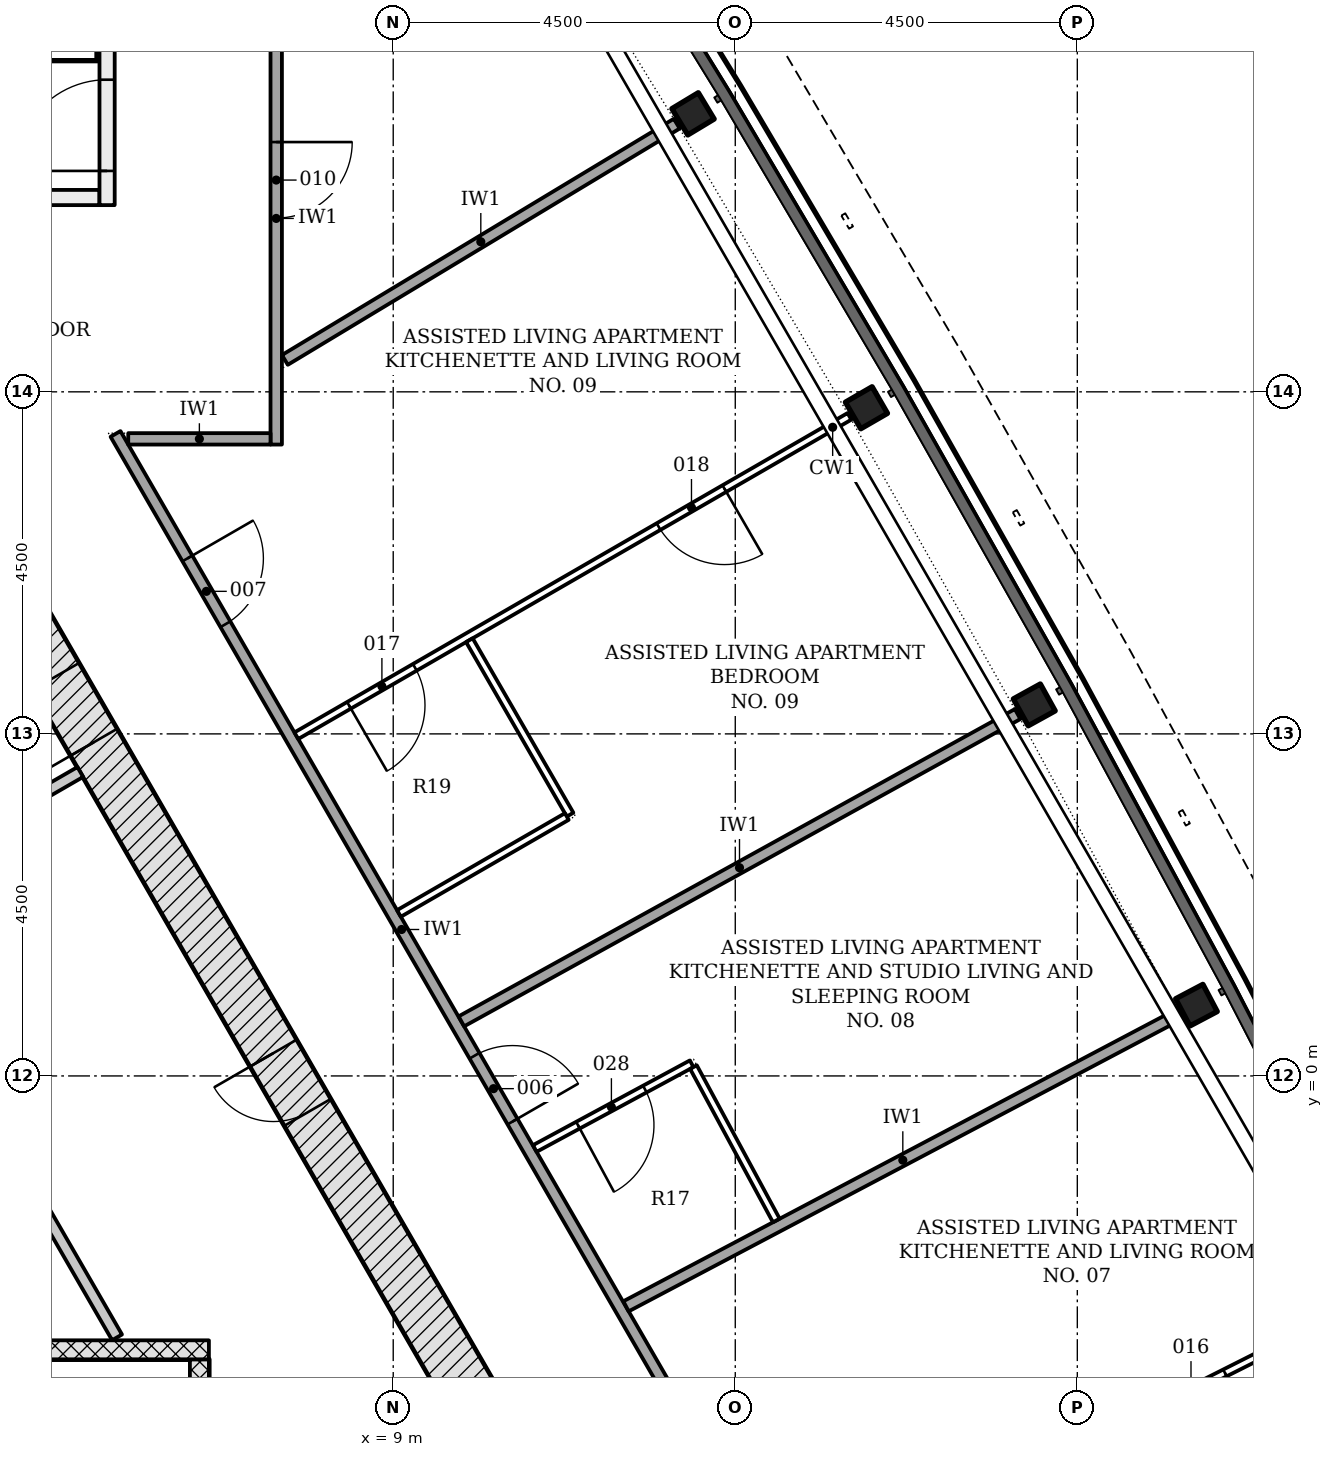
"""IFC4 building model, lengths in metres.
Left out: names, types, materials, properties, quantities, classifications, styles, units other than length and angle.
Written with IfcOpenShell. Run it as: python <this file> out.ifc"""

import sys

from ifc_helpers import new_model, si_unit, direction, frame, frame_2d, origin, origin_2d, place, context, subcontext, project, spatial, rectangle, i_section, extrude, element, fill, save


model = new_model("IFC4")
c1 = context("Model", 3, precision=1e-05, world=origin(), true_north=direction((0.0, 1.0)))
c2 = subcontext(c1, "Body", "Model", "MODEL_VIEW")
j1 = project(units=[si_unit("LENGTHUNIT", "METRE"), si_unit("PLANEANGLEUNIT", "RADIAN")], contexts=[c1])
p1 = place(None, origin())
s1 = spatial("IfcSite", under=j1, at=p1, CompositionType="ELEMENT")
p2 = place(p1, origin())
s2 = spatial("IfcBuilding", under=s1, at=p2, CompositionType="ELEMENT")
p3 = place(p2, frame((0.0, 0.0, 45.6)))
s3 = spatial("IfcBuildingStorey", under=s2, at=p3, CompositionType="ELEMENT", Elevation=45.6)
p4 = place(p3, frame((10.311, -4.703, -0.2), z_axis=(0.0, 0.0, 1.0), x_axis=(-0.500001446645, 0.866024568562, 0.0)))
e1 = element("IfcWall", 1, at=p4, inside=s3, PredefinedType="SHEAR", context=c2, shape_type="SweptSolid", body=[
    extrude(rectangle(XDim=18.458, YDim=0.7, at=frame_2d((9.229, 0.0))), origin(), (0.0, 0.0, 1.0), 3.6),
])
p5 = place(p4, frame((10.5, 0.0, 0.2)))
e2 = element("IfcOpeningElement", 2, at=p5, cuts=e1, PredefinedType="OPENING", context=c2, shape_type="SweptSolid", body=[
    extrude(rectangle(XDim=1.0, YDim=2.1, at=frame_2d((0.5, 1.05))), frame((0.0, 0.36, 0.0), z_axis=(0.0, -1.0, 0.0), x_axis=(1.0, 0.0, 0.0)), (0.0, 0.0, 1.0), 0.72),
])
p6 = place(p4, frame((4.877, 0.0, 0.2)))
e3 = element("IfcOpeningElement", 3, at=p6, cuts=e1, PredefinedType="OPENING", context=c2, shape_type="SweptSolid", body=[
    extrude(rectangle(XDim=0.9, YDim=2.1, at=frame_2d((0.45, 1.05))), frame((0.0, 0.36, 0.0), z_axis=(0.0, -1.0, 0.0), x_axis=(1.0, 0.0, 0.0)), (0.0, 0.0, 1.0), 0.72),
])
p7 = place(p4, frame((14.452, 0.0, 0.2)))
e4 = element("IfcOpeningElement", 4, at=p7, cuts=e1, PredefinedType="OPENING", context=c2, shape_type="SweptSolid", body=[
    extrude(rectangle(XDim=0.9, YDim=2.1, at=frame_2d((0.45, 1.05))), frame((0.0, 0.36, 0.0), z_axis=(0.0, -1.0, 0.0), x_axis=(1.0, 0.0, 0.0)), (0.0, 0.0, 1.0), 0.72),
])
for number, where, z_axis, x_axis in (
    (5, (19.567, 0.931, -0.2), (0.0, 0.0, 1.0), (-0.467, 0.884, 0.0)),
    (6, (17.434, 4.882, -0.2), (0.0, 0.0, 1.0), (-0.484, 0.875, 0.0)),
    (7, (15.226, 8.791, -0.2), (0.0, 0.0, 1.0), (-0.5, 0.866, 0.0)),
    (8, (12.944, 12.657, -0.2), (0.0, 0.0, 1.0), (-0.516, 0.856, 0.0)),
):
    element("IfcColumn", number, at=place(p3, frame(where, z_axis=z_axis, x_axis=x_axis)), inside=s3, PredefinedType="COLUMN", context=c2, shape_type="SweptSolid", body=[
        extrude(i_section(OverallWidth=0.404, OverallDepth=0.406, WebThickness=0.027, FlangeThickness=0.044, FilletRadius=0.015, at=origin_2d()), origin(), (0.0, 0.0, 1.0), 3.6),
    ])
p8 = place(p3, frame((6.45, -6.228, -0.2), z_axis=(0.0, 0.0, 1.0), x_axis=(0.0, 1.0, 0.0)))
e9 = element("IfcWall", 9, at=p8, inside=s3, PredefinedType="PARTITIONING", context=c2, shape_type="SweptSolid", body=[
    extrude(rectangle(XDim=2.5, YDim=0.25, at=frame_2d((1.25, 0.0))), origin(), (0.0, 0.0, 1.0), 3.6),
])
p9 = place(p3, frame((-6.575, -3.603, 0.0), z_axis=(0.0, 0.0, 1.0), x_axis=(1.0, 0.0, 0.0)))
e10 = element("IfcWall", 10, at=p9, inside=s3, PredefinedType="PARTITIONING", context=c2, shape_type="SweptSolid", body=[
    extrude(rectangle(XDim=13.15, YDim=0.25, at=frame_2d((6.575, 0.0))), origin(), (0.0, 0.0, 1.0), 3.4),
])
p10 = place(p3, frame((-4.198, -1.244, 0.0), z_axis=(0.0, 0.0, 1.0), x_axis=(0.866020798945, 0.500007975732, 0.0)))
e11 = element("IfcWall", 11, at=p10, inside=s3, PredefinedType="PARTITIONING", context=c2, shape_type="SweptSolid", body=[
    extrude(rectangle(XDim=10.486, YDim=0.15, at=frame_2d((5.243, 0.0))), origin(), (0.0, 0.0, 1.0), 3.4),
])
p11 = place(p10, frame((3.736, 0.0, 0.0)))
e12 = element("IfcOpeningElement", 12, at=p11, cuts=e11, PredefinedType="OPENING", context=c2, shape_type="SweptSolid", body=[
    extrude(rectangle(XDim=0.9, YDim=2.1, at=frame_2d((0.45, 1.05))), frame((0.0, 0.085, 0.0), z_axis=(0.0, -1.0, 0.0), x_axis=(1.0, 0.0, 0.0)), (0.0, 0.0, 1.0), 0.17),
])
p12 = place(p10, frame((0.144, 0.0, 0.0)))
e13 = element("IfcOpeningElement", 13, at=p12, cuts=e11, PredefinedType="OPENING", context=c2, shape_type="SweptSolid", body=[
    extrude(rectangle(XDim=0.9, YDim=2.1, at=frame_2d((0.45, 1.05))), frame((0.0, 0.085, 0.0), z_axis=(0.0, -1.0, 0.0), x_axis=(1.0, 0.0, 0.0)), (0.0, 0.0, 1.0), 0.17),
])
p13 = place(p3, frame((5.367, -3.439, 0.0), z_axis=(0.0, 0.0, 1.0), x_axis=(-0.499981499682, 0.866036084685, 0.0)))
e14 = element("IfcWall", 14, at=p13, inside=s3, PredefinedType="PARTITIONING", context=c2, shape_type="SweptSolid", body=[
    extrude(rectangle(XDim=6.608, YDim=0.15, at=frame_2d((3.304, 0.0))), origin(), (0.0, 0.0, 1.0), 3.4),
])
p14 = place(p3, frame((5.135, 11.556, -0.2), z_axis=(0.0, 0.0, 1.0), x_axis=(-1.0, 0.0, 0.0)))
e15 = element("IfcWall", 15, at=p14, inside=s3, PredefinedType="SHEAR", context=c2, shape_type="SweptSolid", body=[
    extrude(rectangle(XDim=3.55, YDim=0.2, at=frame_2d((1.775, 0.0))), origin(), (0.0, 0.0, 1.0), 3.6),
])
p15 = place(p14, frame((1.175, 0.0, 0.2)))
e16 = element("IfcOpeningElement", 16, at=p15, cuts=e15, PredefinedType="OPENING", context=c2, shape_type="SweptSolid", body=[
    extrude(rectangle(XDim=1.2, YDim=2.1, at=frame_2d((0.6, 1.05))), frame((0.0, 0.11, 0.0), z_axis=(0.0, -1.0, 0.0), x_axis=(1.0, 0.0, 0.0)), (0.0, 0.0, 1.0), 0.22),
])
p16 = place(p3, frame((5.236, 11.456, -0.2), z_axis=(0.0, 0.0, 1.0), x_axis=(0.0, 1.0, 0.0)))
e17 = element("IfcWall", 17, at=p16, inside=s3, PredefinedType="SHEAR", context=c2, shape_type="SweptSolid", body=[
    extrude(rectangle(XDim=5.6, YDim=0.2, at=frame_2d((2.8, 0.0))), origin(), (0.0, 0.0, 1.0), 3.6),
])
p17 = place(p16, frame((0.45, 0.0, 0.2)))
e18 = element("IfcOpeningElement", 18, at=p17, cuts=e17, PredefinedType="OPENING", context=c2, shape_type="SweptSolid", body=[
    extrude(rectangle(XDim=1.2, YDim=2.1, at=frame_2d((0.6, 1.05))), frame((0.0, 0.11, 0.0), z_axis=(0.0, -1.0, 0.0), x_axis=(1.0, 0.0, 0.0)), (0.0, 0.0, 1.0), 0.22),
])
p18 = place(p3, frame((5.346, 8.446, 0.0), z_axis=(0.0, 0.0, 1.0), x_axis=(0.500008781656, -0.866020333634, 0.0)))
e19 = element("IfcWall", 19, at=p18, inside=s3, PredefinedType="PARTITIONING", context=c2, shape_type="SweptSolid", body=[
    extrude(rectangle(XDim=15.057, YDim=0.15, at=frame_2d((7.528, 0.0))), origin(), (0.0, 0.0, 1.0), 2.778),
])
p19 = place(p18, frame((9.446, 0.0, 0.0)))
e20 = element("IfcOpeningElement", 20, at=p19, cuts=e19, PredefinedType="OPENING", context=c2, shape_type="SweptSolid", body=[
    extrude(rectangle(XDim=1.0, YDim=2.1, at=frame_2d((0.5, 1.05))), frame((0.0, 0.085, 0.0), z_axis=(0.0, -1.0, 0.0), x_axis=(1.0, 0.0, 0.0)), (0.0, 0.0, 1.0), 0.17),
])
p20 = place(p18, frame((1.892, 0.0, 0.0)))
e21 = element("IfcOpeningElement", 21, at=p20, cuts=e19, PredefinedType="OPENING", context=c2, shape_type="SweptSolid", body=[
    extrude(rectangle(XDim=1.0, YDim=2.1, at=frame_2d((0.5, 1.05))), frame((0.0, 0.085, 0.0), z_axis=(0.0, -1.0, 0.0), x_axis=(1.0, 0.0, 0.0)), (0.0, 0.0, 1.0), 0.17),
])
p21 = place(p3, frame((7.461, 14.256, 0.0), z_axis=(0.0, 0.0, 1.0), x_axis=(0.0, -1.0, 0.0)))
e22 = element("IfcWall", 22, at=p21, inside=s3, PredefinedType="PARTITIONING", context=c2, shape_type="SweptSolid", body=[
    extrude(rectangle(XDim=5.95, YDim=0.15, at=frame_2d((2.975, 0.0))), origin(), (0.0, 0.0, 1.0), 2.778),
])
p22 = place(p21, frame((1.97, 0.0, 0.0)))
e23 = element("IfcOpeningElement", 23, at=p22, cuts=e22, PredefinedType="OPENING", context=c2, shape_type="SweptSolid", body=[
    extrude(rectangle(XDim=1.0, YDim=2.1, at=frame_2d((0.5, 1.05))), frame((0.0, 0.085, 0.0), z_axis=(0.0, -1.0, 0.0), x_axis=(1.0, 0.0, 0.0)), (0.0, 0.0, 1.0), 0.17),
])
p23 = place(p3, frame((5.514, 8.381, 0.0), z_axis=(0.0, 0.0, 1.0), x_axis=(1.0, 0.0, 0.0)))
e24 = element("IfcWall", 24, at=p23, inside=s3, PredefinedType="PARTITIONING", context=c2, shape_type="SweptSolid", body=[
    extrude(rectangle(XDim=1.872, YDim=0.15, at=frame_2d((0.936, 0.0))), origin(), (0.0, 0.0, 1.0), 2.778),
])
p24 = place(p3, frame((17.215, 4.76, 0.0), z_axis=(0.0, 0.0, 1.0), x_axis=(-0.875336511681, -0.483514210048, 0.0)))
e25 = element("IfcWall", 25, at=p24, inside=s3, PredefinedType="PARTITIONING", context=c2, shape_type="SweptSolid", body=[
    extrude(rectangle(XDim=8.361, YDim=0.15, at=frame_2d((4.18, 0.0))), origin(), (0.0, 0.0, 1.0), 2.778),
])
p25 = place(p3, frame((19.346, 0.815, 0.0), z_axis=(0.0, 0.0, 1.0), x_axis=(-0.884307928431, -0.466904152599, 0.0)))
e26 = element("IfcWall", 26, at=p25, inside=s3, PredefinedType="PARTITIONING", context=c2, shape_type="SweptSolid", body=[
    extrude(rectangle(XDim=8.237, YDim=0.15, at=frame_2d((4.118, 0.0))), origin(), (0.0, 0.0, 1.0), 2.778),
])
p26 = place(p3, frame((12.73, 12.528, 0.0), z_axis=(0.0, 0.0, 1.0), x_axis=(-0.856413986998, -0.516289727648, 0.0)))
e27 = element("IfcWall", 27, at=p26, inside=s3, PredefinedType="PARTITIONING", context=c2, shape_type="SweptSolid", body=[
    extrude(rectangle(XDim=6.02, YDim=0.15, at=frame_2d((3.01, 0.0))), origin(), (0.0, 0.0, 1.0), 2.778),
])
p27 = place(p3, frame((21.402, -3.171, 0.0), z_axis=(0.0, 0.0, 1.0), x_axis=(-0.892974760713, -0.450106739263, 0.0)))
e28 = element("IfcWall", 28, at=p27, inside=s3, PredefinedType="PARTITIONING", context=c2, shape_type="SweptSolid", body=[
    extrude(rectangle(XDim=8.971, YDim=0.1, at=frame_2d((4.486, 0.0))), origin(), (0.0, 0.0, 1.0), 2.847),
])
p28 = place(p27, frame((6.125, 0.0, 0.0)))
e29 = element("IfcOpeningElement", 29, at=p28, cuts=e28, PredefinedType="OPENING", context=c2, shape_type="SweptSolid", body=[
    extrude(rectangle(XDim=1.0, YDim=2.1, at=frame_2d((0.5, 1.05))), frame((0.0, 0.06, 0.0), z_axis=(0.0, -1.0, 0.0), x_axis=(1.0, 0.0, 0.0)), (0.0, 0.0, 1.0), 0.12),
])
p29 = place(p27, frame((1.635, 0.0, 0.0)))
e30 = element("IfcOpeningElement", 30, at=p29, cuts=e28, PredefinedType="OPENING", context=c2, shape_type="SweptSolid", body=[
    extrude(rectangle(XDim=1.0, YDim=2.1, at=frame_2d((0.5, 1.05))), frame((0.0, 0.06, 0.0), z_axis=(0.0, -1.0, 0.0), x_axis=(1.0, 0.0, 0.0)), (0.0, 0.0, 1.0), 0.12),
])
p30 = place(p3, frame((15.002, 8.677, 0.0), z_axis=(0.0, 0.0, 1.0), x_axis=(-0.866019139798, -0.500010849386, 0.0)))
e31 = element("IfcWall", 31, at=p30, inside=s3, PredefinedType="PARTITIONING", context=c2, shape_type="SweptSolid", body=[
    extrude(rectangle(XDim=8.403, YDim=0.1, at=frame_2d((4.201, 0.0))), origin(), (0.0, 0.0, 1.0), 2.778),
])
p31 = place(p30, frame((6.603, 0.0, 0.0)))
e32 = element("IfcOpeningElement", 32, at=p31, cuts=e31, PredefinedType="OPENING", context=c2, shape_type="SweptSolid", body=[
    extrude(rectangle(XDim=1.0, YDim=2.1, at=frame_2d((0.5, 1.05))), frame((0.0, 0.06, 0.0), z_axis=(0.0, -1.0, 0.0), x_axis=(1.0, 0.0, 0.0)), (0.0, 0.0, 1.0), 0.12),
])
p32 = place(p30, frame((1.9, 0.0, 0.0)))
e33 = element("IfcOpeningElement", 33, at=p32, cuts=e31, PredefinedType="OPENING", context=c2, shape_type="SweptSolid", body=[
    extrude(rectangle(XDim=1.0, YDim=2.1, at=frame_2d((0.5, 1.05))), frame((0.0, 0.06, 0.0), z_axis=(0.0, -1.0, 0.0), x_axis=(1.0, 0.0, 0.0)), (0.0, 0.0, 1.0), 0.12),
])
p33 = place(p3, frame((10.002, 5.732, 0.0), z_axis=(0.0, 0.0, 1.0), x_axis=(0.499993606316, -0.866029095148, 0.0)))
e34 = element("IfcWall", 34, at=p33, inside=s3, PredefinedType="PARTITIONING", context=c2, shape_type="SweptSolid", body=[
    extrude(rectangle(XDim=2.65, YDim=0.1, at=frame_2d((1.325, 0.0))), origin(), (0.0, 0.0, 1.0), 2.778),
])
p34 = place(p3, frame((11.284, 3.413, 0.0), z_axis=(0.0, 0.0, 1.0), x_axis=(-0.866054858364, -0.499948979701, 0.0)))
e35 = element("IfcWall", 35, at=p34, inside=s3, PredefinedType="PARTITIONING", context=c2, shape_type="SweptSolid", body=[
    extrude(rectangle(XDim=2.55, YDim=0.1, at=frame_2d((1.275, 0.0))), origin(), (0.0, 0.0, 1.0), 3.4),
])
p35 = place(p3, frame((12.926, 0.16, 0.0), z_axis=(0.0, 0.0, 1.0), x_axis=(-0.879868843932, -0.475216600591, 0.0)))
e36 = element("IfcWall", 36, at=p35, inside=s3, PredefinedType="PARTITIONING", context=c2, shape_type="SweptSolid", body=[
    extrude(rectangle(XDim=2.346, YDim=0.1, at=frame_2d((1.173, 0.0))), origin(), (0.0, 0.0, 1.0), 3.4),
])
p36 = place(p35, frame((0.7, 0.0, 0.0)))
e37 = element("IfcOpeningElement", 37, at=p36, cuts=e36, PredefinedType="OPENING", context=c2, shape_type="SweptSolid", body=[
    extrude(rectangle(XDim=1.0, YDim=2.1, at=frame_2d((0.5, 1.05))), frame((0.0, 0.06, 0.0), z_axis=(0.0, -1.0, 0.0), x_axis=(1.0, 0.0, 0.0)), (0.0, 0.0, 1.0), 0.12),
])
p37 = place(p3, frame((14.04, -1.902, 0.0), z_axis=(0.0, 0.0, 1.0), x_axis=(-0.475140672056, 0.879909848654, 0.0)))
e38 = element("IfcWall", 38, at=p37, inside=s3, PredefinedType="PARTITIONING", context=c2, shape_type="SweptSolid", body=[
    extrude(rectangle(XDim=2.293, YDim=0.1, at=frame_2d((1.146, 0.0))), origin(), (0.0, 0.0, 1.0), 2.778),
])
p38 = place(p5, origin())
e39 = element("IfcDoor", 39, at=p38, inside=s3, OperationType="SINGLE_SWING_LEFT", PredefinedType="DOOR", context=c2, shape_type="SweptSolid", body=[
    extrude(rectangle(XDim=1.0, YDim=2.1, at=frame_2d((0.5, 1.05))), frame((0.0, 0.075, 0.0), z_axis=(0.0, -1.0, 0.0), x_axis=(1.0, 0.0, 0.0)), (0.0, 0.0, 1.0), 0.15),
])
fill(e2, e39)
p39 = place(p6, origin())
e40 = element("IfcDoor", 40, at=p39, inside=s3, OperationType="SINGLE_SWING_RIGHT", PredefinedType="DOOR", context=c2, shape_type="SweptSolid", body=[
    extrude(rectangle(XDim=0.9, YDim=2.1, at=frame_2d((0.45, 1.05))), frame((0.0, 0.075, 0.0), z_axis=(0.0, -1.0, 0.0), x_axis=(1.0, 0.0, 0.0)), (0.0, 0.0, 1.0), 0.15),
])
fill(e3, e40)
p40 = place(p17, origin())
e41 = element("IfcDoor", 41, at=p40, inside=s3, OperationType="SINGLE_SWING_LEFT", PredefinedType="DOOR", context=c2, shape_type="SweptSolid", body=[
    extrude(rectangle(XDim=1.2, YDim=2.1, at=frame_2d((0.6, 1.05))), frame((0.0, 0.025, 0.0), z_axis=(0.0, -1.0, 0.0), x_axis=(1.0, 0.0, 0.0)), (0.0, 0.0, 1.0), 0.05),
])
fill(e18, e41)
p41 = place(p19, origin())
e42 = element("IfcDoor", 42, at=p41, inside=s3, OperationType="SINGLE_SWING_RIGHT", PredefinedType="DOOR", context=c2, shape_type="SweptSolid", body=[
    extrude(rectangle(XDim=1.0, YDim=2.1, at=frame_2d((0.5, 1.05))), frame((0.0, 0.025, 0.0), z_axis=(0.0, -1.0, 0.0), x_axis=(1.0, 0.0, 0.0)), (0.0, 0.0, 1.0), 0.05),
])
fill(e20, e42)
p42 = place(p20, origin())
e43 = element("IfcDoor", 43, at=p42, inside=s3, OperationType="SINGLE_SWING_LEFT", PredefinedType="DOOR", context=c2, shape_type="SweptSolid", body=[
    extrude(rectangle(XDim=1.0, YDim=2.1, at=frame_2d((0.5, 1.05))), frame((0.0, 0.025, 0.0), z_axis=(0.0, -1.0, 0.0), x_axis=(1.0, 0.0, 0.0)), (0.0, 0.0, 1.0), 0.05),
])
fill(e21, e43)
p43 = place(p22, origin())
e44 = element("IfcDoor", 44, at=p43, inside=s3, OperationType="SINGLE_SWING_LEFT", PredefinedType="DOOR", context=c2, shape_type="SweptSolid", body=[
    extrude(rectangle(XDim=1.0, YDim=2.1, at=frame_2d((0.5, 1.05))), frame((0.0, 0.025, 0.0), z_axis=(0.0, -1.0, 0.0), x_axis=(1.0, 0.0, 0.0)), (0.0, 0.0, 1.0), 0.05),
])
fill(e23, e44)
p44 = place(p29, origin())
e45 = element("IfcDoor", 45, at=p44, inside=s3, OperationType="SINGLE_SWING_LEFT", PredefinedType="DOOR", context=c2, shape_type="SweptSolid", body=[
    extrude(rectangle(XDim=1.0, YDim=2.1, at=frame_2d((0.5, 1.05))), frame((0.0, 0.025, 0.0), z_axis=(0.0, -1.0, 0.0), x_axis=(1.0, 0.0, 0.0)), (0.0, 0.0, 1.0), 0.05),
])
fill(e30, e45)
p45 = place(p31, origin())
e46 = element("IfcDoor", 46, at=p45, inside=s3, OperationType="SINGLE_SWING_RIGHT", PredefinedType="DOOR", context=c2, shape_type="SweptSolid", body=[
    extrude(rectangle(XDim=1.0, YDim=2.1, at=frame_2d((0.5, 1.05))), frame((0.0, 0.025, 0.0), z_axis=(0.0, -1.0, 0.0), x_axis=(1.0, 0.0, 0.0)), (0.0, 0.0, 1.0), 0.05),
])
fill(e32, e46)
p46 = place(p32, origin())
e47 = element("IfcDoor", 47, at=p46, inside=s3, OperationType="SINGLE_SWING_LEFT", PredefinedType="DOOR", context=c2, shape_type="SweptSolid", body=[
    extrude(rectangle(XDim=1.0, YDim=2.1, at=frame_2d((0.5, 1.05))), frame((0.0, 0.025, 0.0), z_axis=(0.0, -1.0, 0.0), x_axis=(1.0, 0.0, 0.0)), (0.0, 0.0, 1.0), 0.05),
])
fill(e33, e47)
p47 = place(p36, origin())
e48 = element("IfcDoor", 48, at=p47, inside=s3, OperationType="SINGLE_SWING_RIGHT", PredefinedType="DOOR", context=c2, shape_type="SweptSolid", body=[
    extrude(rectangle(XDim=1.0, YDim=2.1, at=frame_2d((0.5, 1.05))), frame((0.0, 0.025, 0.0), z_axis=(0.0, -1.0, 0.0), x_axis=(1.0, 0.0, 0.0)), (0.0, 0.0, 1.0), 0.05),
])
fill(e37, e48)
save(model, sys.argv[1])
